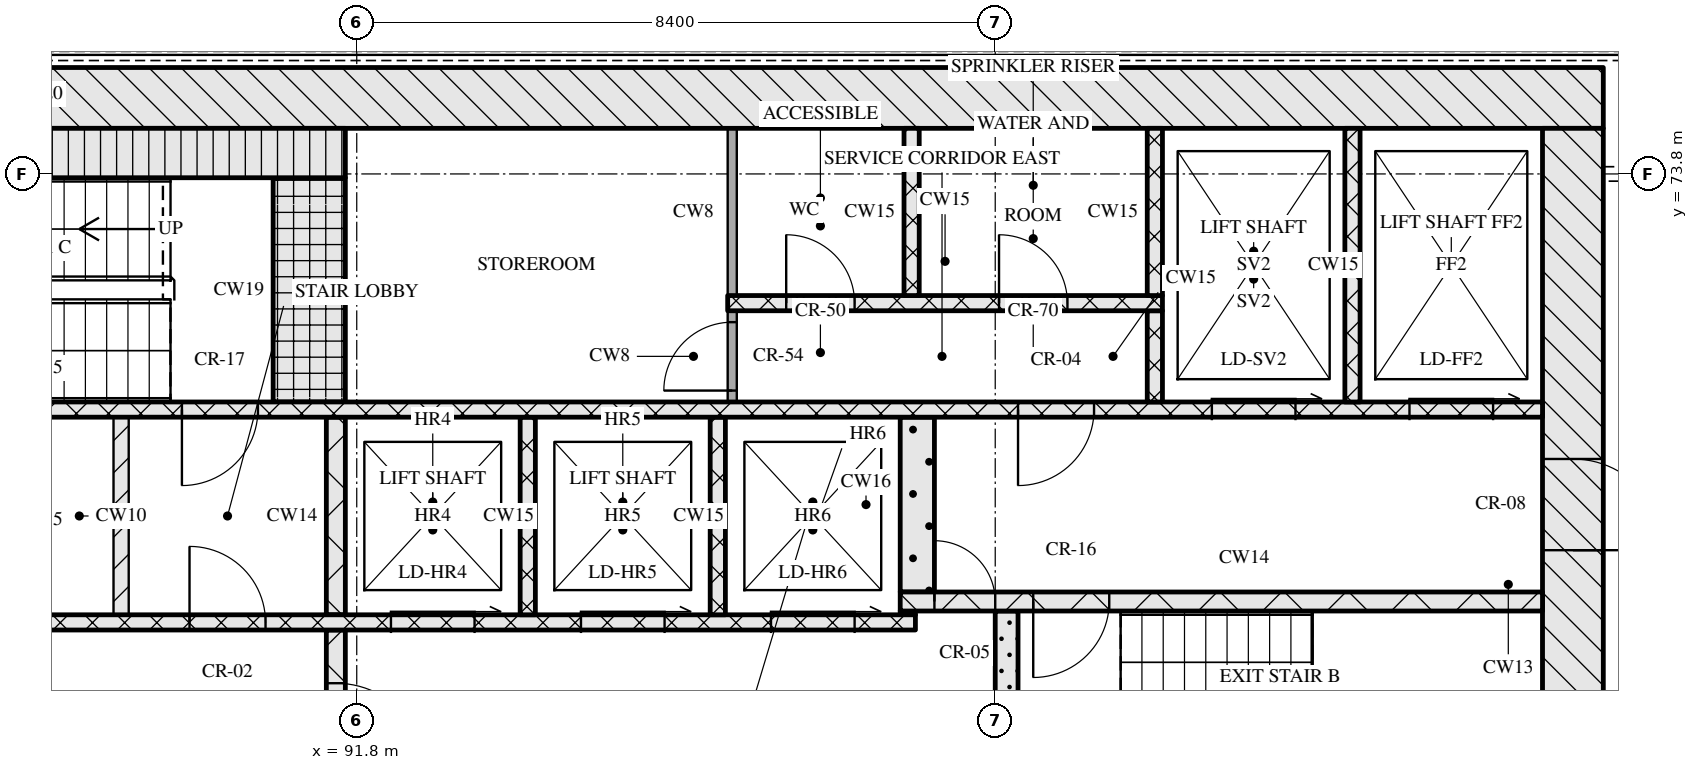
"""IFC4 building model, lengths in metres.
Left out: names, types, materials, properties, quantities, classifications, styles, units other than length and angle.
Written with IfcOpenShell. Run it as: python <this file> out.ifc"""

import sys

from ifc_helpers import new_model, si_unit, direction, frame, frame_2d, origin, place, context, subcontext, project, spatial, rectangle, extrude, element, fill, save


model = new_model("IFC4")
c1 = context("Model", 3, precision=1e-05, world=origin(), true_north=direction((0.0, 1.0)))
c2 = subcontext(c1, "Body", "Model", "MODEL_VIEW")
j1 = project(units=[si_unit("LENGTHUNIT", "METRE"), si_unit("PLANEANGLEUNIT", "RADIAN")], contexts=[c1])
p1 = place(None, origin())
s1 = spatial("IfcSite", under=j1, at=p1, CompositionType="ELEMENT")
p2 = place(p1, origin())
s2 = spatial("IfcBuilding", under=s1, at=p2, CompositionType="ELEMENT")
p3 = place(p2, frame((0.0, 0.0, 190.65)))
s3 = spatial("IfcBuildingStorey", under=s2, at=p3, CompositionType="ELEMENT", Elevation=190.65)
p4 = place(p3, frame((67.0, 74.8, 0.0), z_axis=(0.0, 0.0, 1.0), x_axis=(1.0, 0.0, 0.0)))
e1 = element("IfcWall", 1, at=p4, inside=s3, PredefinedType="SOLIDWALL", context=c2, shape_type="SweptSolid", body=[
    extrude(rectangle(XDim=41.2, YDim=0.8, at=frame_2d((20.6, 0.0))), origin(), (0.0, 0.0, 1.0), 3.3),
])
p5 = place(p3, frame((107.8, 62.4, 0.0), z_axis=(0.0, 0.0, 1.0), x_axis=(0.0, 1.0, 0.0)))
e2 = element("IfcWall", 2, at=p5, inside=s3, PredefinedType="SOLIDWALL", context=c2, shape_type="SweptSolid", body=[
    extrude(rectangle(XDim=12.0, YDim=0.8, at=frame_2d((6.0, 0.0))), origin(), (0.0, 0.0, 1.0), 3.3),
])
p6 = place(p5, frame((6.45, 0.0, 0.0)))
e3 = element("IfcOpeningElement", 3, at=p6, cuts=e2, PredefinedType="OPENING", context=c2, shape_type="SweptSolid", body=[
    extrude(rectangle(XDim=1.2, YDim=2.1, at=frame_2d((0.6, 1.05))), frame((0.0, 0.41, 0.0), z_axis=(0.0, -1.0, 0.0), x_axis=(1.0, 0.0, 0.0)), (0.0, 0.0, 1.0), 0.82),
])
p7 = place(p3, frame((91.525, 65.2, 0.0), z_axis=(0.0, 0.0, 1.0), x_axis=(0.0, 1.0, 0.0)))
e4 = element("IfcWall", 4, at=p7, inside=s3, PredefinedType="SOLIDWALL", context=c2, shape_type="SweptSolid", body=[
    extrude(rectangle(XDim=2.6, YDim=0.25, at=frame_2d((1.3, 0.0))), origin(), (0.0, 0.0, 1.0), 3.3),
])
p8 = place(p7, frame((0.7, 0.0, 0.0)))
e5 = element("IfcOpeningElement", 5, at=p8, cuts=e4, PredefinedType="OPENING", context=c2, shape_type="SweptSolid", body=[
    extrude(rectangle(XDim=1.2, YDim=2.1, at=frame_2d((0.6, 1.05))), frame((0.0, 0.135, 0.0), z_axis=(0.0, -1.0, 0.0), x_axis=(1.0, 0.0, 0.0)), (0.0, 0.0, 1.0), 0.27),
])
p9 = place(p3, frame((100.35, 65.2, 0.0), z_axis=(0.0, 0.0, 1.0), x_axis=(0.0, 1.0, 0.0)))
e6 = element("IfcWall", 6, at=p9, inside=s3, PredefinedType="SOLIDWALL", context=c2, shape_type="SweptSolid", body=[
    extrude(rectangle(XDim=2.85, YDim=0.3, at=frame_2d((1.425, 0.0))), origin(), (0.0, 0.0, 1.0), 3.3),
])
p10 = place(p3, frame((76.05, 67.9, 0.0), z_axis=(0.0, 0.0, 1.0), x_axis=(1.0, 0.0, 0.0)))
e7 = element("IfcWall", 7, at=p10, inside=s3, PredefinedType="SOLIDWALL", context=c2, shape_type="SweptSolid", body=[
    extrude(rectangle(XDim=23.1, YDim=0.2, at=frame_2d((11.55, 0.0))), origin(), (0.0, 0.0, 1.0), 3.3),
])
p11 = place(p10, frame((1.95, 0.0, 0.0)))
e8 = element("IfcOpeningElement", 8, at=p11, cuts=e7, PredefinedType="OPENING", context=c2, shape_type="SweptSolid", body=[
    extrude(rectangle(XDim=0.9, YDim=2.1, at=frame_2d((0.45, 1.05))), frame((0.0, 0.11, 0.0), z_axis=(0.0, -1.0, 0.0), x_axis=(1.0, 0.0, 0.0)), (0.0, 0.0, 1.0), 0.22),
])
p12 = place(p10, frame((5.66, 0.0, 0.0)))
e9 = element("IfcOpeningElement", 9, at=p12, cuts=e7, PredefinedType="OPENING", context=c2, shape_type="SweptSolid", body=[
    extrude(rectangle(XDim=0.9, YDim=2.1, at=frame_2d((0.45, 1.05))), frame((0.0, 0.11, 0.0), z_axis=(0.0, -1.0, 0.0), x_axis=(1.0, 0.0, 0.0)), (0.0, 0.0, 1.0), 0.22),
])
p13 = place(p10, frame((9.7, 0.0, 0.0)))
e10 = element("IfcOpeningElement", 10, at=p13, cuts=e7, PredefinedType="OPENING", context=c2, shape_type="SweptSolid", body=[
    extrude(rectangle(XDim=0.9, YDim=2.1, at=frame_2d((0.45, 1.05))), frame((0.0, 0.11, 0.0), z_axis=(0.0, -1.0, 0.0), x_axis=(1.0, 0.0, 0.0)), (0.0, 0.0, 1.0), 0.22),
])
p14 = place(p10, frame((13.55, 0.0, 0.0)))
e11 = element("IfcOpeningElement", 11, at=p14, cuts=e7, PredefinedType="OPENING", context=c2, shape_type="SweptSolid", body=[
    extrude(rectangle(XDim=1.0, YDim=2.1, at=frame_2d((0.5, 1.05))), frame((0.0, 0.11, 0.0), z_axis=(0.0, -1.0, 0.0), x_axis=(1.0, 0.0, 0.0)), (0.0, 0.0, 1.0), 0.22),
])
p15 = place(p10, frame((16.2, 0.0, 0.0)))
e12 = element("IfcOpeningElement", 12, at=p15, cuts=e7, PredefinedType="OPENING", context=c2, shape_type="SweptSolid", body=[
    extrude(rectangle(XDim=1.1, YDim=2.1, at=frame_2d((0.55, 1.05))), frame((0.0, 0.11, 0.0), z_axis=(0.0, -1.0, 0.0), x_axis=(1.0, 0.0, 0.0)), (0.0, 0.0, 1.0), 0.22),
])
p16 = place(p10, frame((18.7, 0.0, 0.0)))
e13 = element("IfcOpeningElement", 13, at=p16, cuts=e7, PredefinedType="OPENING", context=c2, shape_type="SweptSolid", body=[
    extrude(rectangle(XDim=1.1, YDim=2.1, at=frame_2d((0.55, 1.05))), frame((0.0, 0.11, 0.0), z_axis=(0.0, -1.0, 0.0), x_axis=(1.0, 0.0, 0.0)), (0.0, 0.0, 1.0), 0.22),
])
p17 = place(p10, frame((21.2, 0.0, 0.0)))
e14 = element("IfcOpeningElement", 14, at=p17, cuts=e7, PredefinedType="OPENING", context=c2, shape_type="SweptSolid", body=[
    extrude(rectangle(XDim=1.1, YDim=2.1, at=frame_2d((0.55, 1.05))), frame((0.0, 0.11, 0.0), z_axis=(0.0, -1.0, 0.0), x_axis=(1.0, 0.0, 0.0)), (0.0, 0.0, 1.0), 0.22),
])
p18 = place(p3, frame((88.7, 68.0, 0.0), z_axis=(0.0, 0.0, 1.0), x_axis=(0.0, 1.0, 0.0)))
e15 = element("IfcWall", 15, at=p18, inside=s3, PredefinedType="PARTITIONING", context=c2, shape_type="SweptSolid", body=[
    extrude(rectangle(XDim=2.6, YDim=0.2, at=frame_2d((1.3, 0.0))), origin(), (0.0, 0.0, 1.0), 3.3),
])
p19 = place(p3, frame((91.525, 68.0, 0.0), z_axis=(0.0, 0.0, 1.0), x_axis=(0.0, 1.0, 0.0)))
e16 = element("IfcWall", 16, at=p19, inside=s3, PredefinedType="SOLIDWALL", context=c2, shape_type="SweptSolid", body=[
    extrude(rectangle(XDim=2.6, YDim=0.25, at=frame_2d((1.3, 0.0))), origin(), (0.0, 0.0, 1.0), 3.3),
])
for number, where, z_axis, x_axis in (
    (17, (94.05, 68.0, 0.0), (0.0, 0.0, 1.0), (0.0, 1.0, 0.0)),
    (18, (96.55, 68.0, 0.0), (0.0, 0.0, 1.0), (0.0, 1.0, 0.0)),
):
    element("IfcWall", number, at=place(p3, frame(where, z_axis=z_axis, x_axis=x_axis)), inside=s3, PredefinedType="SOLIDWALL", context=c2, shape_type="SweptSolid", body=[
        extrude(rectangle(XDim=2.6, YDim=0.2, at=frame_2d((1.3, 0.0))), origin(), (0.0, 0.0, 1.0), 3.3),
    ])
p20 = place(p3, frame((98.95, 68.025, 0.0), z_axis=(0.0, 0.0, 1.0), x_axis=(1.0, 0.0, 0.0)))
e19 = element("IfcWall", 19, at=p20, inside=s3, PredefinedType="SOLIDWALL", context=c2, shape_type="SweptSolid", body=[
    extrude(rectangle(XDim=0.2, YDim=0.05, at=frame_2d((0.1, 0.0))), origin(), (0.0, 0.0, 1.0), 3.3),
])
p21 = place(p3, frame((98.95, 68.175, 0.0), z_axis=(0.0, 0.0, 1.0), x_axis=(1.0, 0.0, 0.0)))
e20 = element("IfcWall", 20, at=p21, inside=s3, PredefinedType="SOLIDWALL", context=c2, shape_type="SweptSolid", body=[
    extrude(rectangle(XDim=8.45, YDim=0.25, at=frame_2d((4.225, 0.0))), origin(), (0.0, 0.0, 1.0), 3.3),
])
p22 = place(p21, frame((0.45, 0.0, 0.0)))
e21 = element("IfcOpeningElement", 21, at=p22, cuts=e20, PredefinedType="OPENING", context=c2, shape_type="SweptSolid", body=[
    extrude(rectangle(XDim=0.8, YDim=2.1, at=frame_2d((0.4, 1.05))), frame((0.0, 0.135, 0.0), z_axis=(0.0, -1.0, 0.0), x_axis=(1.0, 0.0, 0.0)), (0.0, 0.0, 1.0), 0.27),
])
p23 = place(p21, frame((1.75, 0.0, 0.0)))
e22 = element("IfcOpeningElement", 22, at=p23, cuts=e20, PredefinedType="OPENING", context=c2, shape_type="SweptSolid", body=[
    extrude(rectangle(XDim=1.0, YDim=2.1, at=frame_2d((0.5, 1.05))), frame((0.0, 0.135, 0.0), z_axis=(0.0, -1.0, 0.0), x_axis=(1.0, 0.0, 0.0)), (0.0, 0.0, 1.0), 0.27),
])
p24 = place(p3, frame((99.175, 68.3, 0.0), z_axis=(0.0, 0.0, 1.0), x_axis=(0.0, 1.0, 0.0)))
e23 = element("IfcWall", 23, at=p24, inside=s3, PredefinedType="SOLIDWALL", context=c2, shape_type="SweptSolid", body=[
    extrude(rectangle(XDim=2.3, YDim=0.45, at=frame_2d((1.15, 0.0))), origin(), (0.0, 0.0, 1.0), 3.3),
])
p25 = place(p3, frame((67.8, 70.7, 0.0), z_axis=(0.0, 0.0, 1.0), x_axis=(1.0, 0.0, 0.0)))
e24 = element("IfcWall", 24, at=p25, inside=s3, PredefinedType="SOLIDWALL", context=c2, shape_type="SweptSolid", body=[
    extrude(rectangle(XDim=39.6, YDim=0.2, at=frame_2d((19.8, 0.0))), origin(), (0.0, 0.0, 1.0), 3.3),
])
p26 = place(p25, frame((0.65, 0.0, 0.0)))
e25 = element("IfcOpeningElement", 25, at=p26, cuts=e24, PredefinedType="OPENING", context=c2, shape_type="SweptSolid", body=[
    extrude(rectangle(XDim=1.1, YDim=2.1, at=frame_2d((0.55, 1.05))), frame((0.0, 0.11, 0.0), z_axis=(0.0, -1.0, 0.0), x_axis=(1.0, 0.0, 0.0)), (0.0, 0.0, 1.0), 0.22),
])
p27 = place(p25, frame((3.25, 0.0, 0.0)))
e26 = element("IfcOpeningElement", 26, at=p27, cuts=e24, PredefinedType="OPENING", context=c2, shape_type="SweptSolid", body=[
    extrude(rectangle(XDim=1.1, YDim=2.1, at=frame_2d((0.55, 1.05))), frame((0.0, 0.11, 0.0), z_axis=(0.0, -1.0, 0.0), x_axis=(1.0, 0.0, 0.0)), (0.0, 0.0, 1.0), 0.22),
])
p28 = place(p25, frame((5.9, 0.0, 0.0)))
e27 = element("IfcOpeningElement", 27, at=p28, cuts=e24, PredefinedType="OPENING", context=c2, shape_type="SweptSolid", body=[
    extrude(rectangle(XDim=1.0, YDim=2.1, at=frame_2d((0.5, 1.05))), frame((0.0, 0.11, 0.0), z_axis=(0.0, -1.0, 0.0), x_axis=(1.0, 0.0, 0.0)), (0.0, 0.0, 1.0), 0.22),
])
p29 = place(p25, frame((21.7, 0.0, 0.0)))
e28 = element("IfcOpeningElement", 28, at=p29, cuts=e24, PredefinedType="OPENING", context=c2, shape_type="SweptSolid", body=[
    extrude(rectangle(XDim=1.0, YDim=2.1, at=frame_2d((0.5, 1.05))), frame((0.0, 0.11, 0.0), z_axis=(0.0, -1.0, 0.0), x_axis=(1.0, 0.0, 0.0)), (0.0, 0.0, 1.0), 0.22),
])
p30 = place(p25, frame((32.7, 0.0, 0.0)))
e29 = element("IfcOpeningElement", 29, at=p30, cuts=e24, PredefinedType="OPENING", context=c2, shape_type="SweptSolid", body=[
    extrude(rectangle(XDim=1.0, YDim=2.1, at=frame_2d((0.5, 1.05))), frame((0.0, 0.11, 0.0), z_axis=(0.0, -1.0, 0.0), x_axis=(1.0, 0.0, 0.0)), (0.0, 0.0, 1.0), 0.22),
])
p31 = place(p25, frame((35.25, 0.0, 0.0)))
e30 = element("IfcOpeningElement", 30, at=p31, cuts=e24, PredefinedType="OPENING", context=c2, shape_type="SweptSolid", body=[
    extrude(rectangle(XDim=1.1, YDim=2.1, at=frame_2d((0.55, 1.05))), frame((0.0, 0.11, 0.0), z_axis=(0.0, -1.0, 0.0), x_axis=(1.0, 0.0, 0.0)), (0.0, 0.0, 1.0), 0.22),
])
p32 = place(p25, frame((37.85, 0.0, 0.0)))
e31 = element("IfcOpeningElement", 31, at=p32, cuts=e24, PredefinedType="OPENING", context=c2, shape_type="SweptSolid", body=[
    extrude(rectangle(XDim=1.1, YDim=2.1, at=frame_2d((0.55, 1.05))), frame((0.0, 0.11, 0.0), z_axis=(0.0, -1.0, 0.0), x_axis=(1.0, 0.0, 0.0)), (0.0, 0.0, 1.0), 0.22),
])
p33 = place(p3, frame((91.175, 70.8, 0.0), z_axis=(0.0, 0.0, 1.0), x_axis=(0.0, 1.0, 0.0)))
e32 = element("IfcWall", 32, at=p33, inside=s3, PredefinedType="SOLIDWALL", context=c2, shape_type="SweptSolid", body=[
    extrude(rectangle(XDim=2.95, YDim=0.95, at=frame_2d((1.475, 0.0))), origin(), (0.0, 0.0, 1.0), 3.3),
])
p34 = place(p3, frame((96.74, 70.8, 0.0), z_axis=(0.0, 0.0, 1.0), x_axis=(0.0, 1.0, 0.0)))
e33 = element("IfcWall", 33, at=p34, inside=s3, PredefinedType="PARTITIONING", context=c2, shape_type="SweptSolid", body=[
    extrude(rectangle(XDim=1.2, YDim=0.12, at=frame_2d((0.6, 0.0))), origin(), (0.0, 0.0, 1.0), 3.3),
])
p35 = place(p34, frame((0.15, 0.0, 0.0)))
e34 = element("IfcOpeningElement", 34, at=p35, cuts=e33, PredefinedType="OPENING", context=c2, shape_type="SweptSolid", body=[
    extrude(rectangle(XDim=0.9, YDim=2.1, at=frame_2d((0.45, 1.05))), frame((0.0, 0.07, 0.0), z_axis=(0.0, -1.0, 0.0), x_axis=(1.0, 0.0, 0.0)), (0.0, 0.0, 1.0), 0.14),
])
p36 = place(p3, frame((102.3, 70.8, 0.0), z_axis=(0.0, 0.0, 1.0), x_axis=(0.0, 1.0, 0.0)))
e35 = element("IfcWall", 35, at=p36, inside=s3, PredefinedType="SOLIDWALL", context=c2, shape_type="SweptSolid", body=[
    extrude(rectangle(XDim=1.2, YDim=0.2, at=frame_2d((0.6, 0.0))), origin(), (0.0, 0.0, 1.0), 3.3),
])
p37 = place(p3, frame((104.9, 70.8, 0.0), z_axis=(0.0, 0.0, 1.0), x_axis=(0.0, 1.0, 0.0)))
e36 = element("IfcWall", 36, at=p37, inside=s3, PredefinedType="SOLIDWALL", context=c2, shape_type="SweptSolid", body=[
    extrude(rectangle(XDim=3.6, YDim=0.2, at=frame_2d((1.8, 0.0))), origin(), (0.0, 0.0, 1.0), 3.3),
])
p38 = place(p3, frame((96.68, 72.1, 0.0), z_axis=(0.0, 0.0, 1.0), x_axis=(1.0, 0.0, 0.0)))
e37 = element("IfcWall", 37, at=p38, inside=s3, PredefinedType="SOLIDWALL", context=c2, shape_type="SweptSolid", body=[
    extrude(rectangle(XDim=5.72, YDim=0.2, at=frame_2d((2.86, 0.0))), origin(), (0.0, 0.0, 1.0), 3.3),
])
p39 = place(p38, frame((0.77, 0.0, 0.0)))
e38 = element("IfcOpeningElement", 38, at=p39, cuts=e37, PredefinedType="OPENING", context=c2, shape_type="SweptSolid", body=[
    extrude(rectangle(XDim=0.9, YDim=2.1, at=frame_2d((0.45, 1.05))), frame((0.0, 0.11, 0.0), z_axis=(0.0, -1.0, 0.0), x_axis=(1.0, 0.0, 0.0)), (0.0, 0.0, 1.0), 0.22),
])
p40 = place(p38, frame((3.57, 0.0, 0.0)))
e39 = element("IfcOpeningElement", 39, at=p40, cuts=e37, PredefinedType="OPENING", context=c2, shape_type="SweptSolid", body=[
    extrude(rectangle(XDim=0.9, YDim=2.1, at=frame_2d((0.45, 1.05))), frame((0.0, 0.11, 0.0), z_axis=(0.0, -1.0, 0.0), x_axis=(1.0, 0.0, 0.0)), (0.0, 0.0, 1.0), 0.22),
])
p41 = place(p3, frame((96.74, 72.2, 0.0), z_axis=(0.0, 0.0, 1.0), x_axis=(0.0, 1.0, 0.0)))
e40 = element("IfcWall", 40, at=p41, inside=s3, PredefinedType="PARTITIONING", context=c2, shape_type="SweptSolid", body=[
    extrude(rectangle(XDim=2.2, YDim=0.12, at=frame_2d((1.1, 0.0))), origin(), (0.0, 0.0, 1.0), 3.3),
])
for number, where, z_axis, x_axis in (
    (41, (99.1, 72.2, 0.0), (0.0, 0.0, 1.0), (0.0, 1.0, 0.0)),
    (42, (102.3, 72.2, 0.0), (0.0, 0.0, 1.0), (0.0, 1.0, 0.0)),
):
    element("IfcWall", number, at=place(p3, frame(where, z_axis=z_axis, x_axis=x_axis)), inside=s3, PredefinedType="SOLIDWALL", context=c2, shape_type="SweptSolid", body=[
        extrude(rectangle(XDim=2.2, YDim=0.2, at=frame_2d((1.1, 0.0))), origin(), (0.0, 0.0, 1.0), 3.3),
    ])
p42 = place(p3, frame((83.55, 74.075, 0.0), z_axis=(0.0, 0.0, 1.0), x_axis=(1.0, 0.0, 0.0)))
e43 = element("IfcWall", 43, at=p42, inside=s3, PredefinedType="SOLIDWALL", context=c2, shape_type="SweptSolid", body=[
    extrude(rectangle(XDim=8.1, YDim=0.65, at=frame_2d((4.05, 0.0))), origin(), (0.0, 0.0, 1.0), 3.3),
])
p43 = place(p8, origin())
e44 = element("IfcDoor", 44, at=p43, inside=s3, OperationType="SINGLE_SWING_RIGHT", PredefinedType="DOOR", context=c2, shape_type="SweptSolid", body=[
    extrude(rectangle(XDim=1.2, YDim=2.1, at=frame_2d((0.6, 1.05))), frame((0.0, 0.025, 0.0), z_axis=(0.0, -1.0, 0.0), x_axis=(1.0, 0.0, 0.0)), (0.0, 0.0, 1.0), 0.05),
])
fill(e5, e44)
p44 = place(p14, origin())
e45 = element("IfcDoor", 45, at=p44, inside=s3, OperationType="SINGLE_SWING_LEFT", PredefinedType="DOOR", context=c2, shape_type="SweptSolid", body=[
    extrude(rectangle(XDim=1.0, YDim=2.1, at=frame_2d((0.5, 1.05))), frame((0.0, 0.025, 0.0), z_axis=(0.0, -1.0, 0.0), x_axis=(1.0, 0.0, 0.0)), (0.0, 0.0, 1.0), 0.05),
])
fill(e11, e45)
p45 = place(p15, origin())
e46 = element("IfcDoor", 46, at=p45, inside=s3, OperationType="SLIDING_TO_RIGHT", PredefinedType="DOOR", context=c2, shape_type="SweptSolid", body=[
    extrude(rectangle(XDim=1.1, YDim=2.1, at=frame_2d((0.55, 1.05))), frame((0.0, 0.025, 0.0), z_axis=(0.0, -1.0, 0.0), x_axis=(1.0, 0.0, 0.0)), (0.0, 0.0, 1.0), 0.05),
])
fill(e12, e46)
p46 = place(p16, origin())
e47 = element("IfcDoor", 47, at=p46, inside=s3, OperationType="SLIDING_TO_RIGHT", PredefinedType="DOOR", context=c2, shape_type="SweptSolid", body=[
    extrude(rectangle(XDim=1.1, YDim=2.1, at=frame_2d((0.55, 1.05))), frame((0.0, 0.025, 0.0), z_axis=(0.0, -1.0, 0.0), x_axis=(1.0, 0.0, 0.0)), (0.0, 0.0, 1.0), 0.05),
])
fill(e13, e47)
p47 = place(p17, origin())
e48 = element("IfcDoor", 48, at=p47, inside=s3, OperationType="SLIDING_TO_RIGHT", PredefinedType="DOOR", context=c2, shape_type="SweptSolid", body=[
    extrude(rectangle(XDim=1.1, YDim=2.1, at=frame_2d((0.55, 1.05))), frame((0.0, 0.025, 0.0), z_axis=(0.0, -1.0, 0.0), x_axis=(1.0, 0.0, 0.0)), (0.0, 0.0, 1.0), 0.05),
])
fill(e14, e48)
p48 = place(p22, origin())
e49 = element("IfcDoor", 49, at=p48, inside=s3, OperationType="SINGLE_SWING_LEFT", PredefinedType="DOOR", context=c2, shape_type="SweptSolid", body=[
    extrude(rectangle(XDim=0.8, YDim=2.1, at=frame_2d((0.4, 1.05))), frame((0.0, 0.025, 0.0), z_axis=(0.0, -1.0, 0.0), x_axis=(1.0, 0.0, 0.0)), (0.0, 0.0, 1.0), 0.05),
])
fill(e21, e49)
p49 = place(p23, origin())
e50 = element("IfcDoor", 50, at=p49, inside=s3, OperationType="SINGLE_SWING_RIGHT", PredefinedType="DOOR", context=c2, shape_type="SweptSolid", body=[
    extrude(rectangle(XDim=1.0, YDim=2.1, at=frame_2d((0.5, 1.05))), frame((0.0, 0.025, 0.0), z_axis=(0.0, -1.0, 0.0), x_axis=(1.0, 0.0, 0.0)), (0.0, 0.0, 1.0), 0.05),
])
fill(e22, e50)
p50 = place(p6, origin())
e51 = element("IfcDoor", 51, at=p50, inside=s3, OperationType="SINGLE_SWING_RIGHT", PredefinedType="DOOR", context=c2, shape_type="SweptSolid", body=[
    extrude(rectangle(XDim=1.2, YDim=2.1, at=frame_2d((0.6, 1.05))), frame((0.0, 0.025, 0.0), z_axis=(0.0, -1.0, 0.0), x_axis=(1.0, 0.0, 0.0)), (0.0, 0.0, 1.0), 0.05),
])
fill(e3, e51)
p51 = place(p29, origin())
e52 = element("IfcDoor", 52, at=p51, inside=s3, OperationType="SINGLE_SWING_RIGHT", PredefinedType="DOOR", context=c2, shape_type="SweptSolid", body=[
    extrude(rectangle(XDim=1.0, YDim=2.1, at=frame_2d((0.5, 1.05))), frame((0.0, 0.025, 0.0), z_axis=(0.0, -1.0, 0.0), x_axis=(1.0, 0.0, 0.0)), (0.0, 0.0, 1.0), 0.05),
])
fill(e28, e52)
p52 = place(p30, origin())
e53 = element("IfcDoor", 53, at=p52, inside=s3, OperationType="SINGLE_SWING_RIGHT", PredefinedType="DOOR", context=c2, shape_type="SweptSolid", body=[
    extrude(rectangle(XDim=1.0, YDim=2.1, at=frame_2d((0.5, 1.05))), frame((0.0, 0.025, 0.0), z_axis=(0.0, -1.0, 0.0), x_axis=(1.0, 0.0, 0.0)), (0.0, 0.0, 1.0), 0.05),
])
fill(e29, e53)
p53 = place(p31, origin())
e54 = element("IfcDoor", 54, at=p53, inside=s3, OperationType="SLIDING_TO_RIGHT", PredefinedType="DOOR", context=c2, shape_type="SweptSolid", body=[
    extrude(rectangle(XDim=1.1, YDim=2.1, at=frame_2d((0.55, 1.05))), frame((0.0, 0.025, 0.0), z_axis=(0.0, -1.0, 0.0), x_axis=(1.0, 0.0, 0.0)), (0.0, 0.0, 1.0), 0.05),
])
fill(e30, e54)
p54 = place(p32, origin())
e55 = element("IfcDoor", 55, at=p54, inside=s3, OperationType="SLIDING_TO_RIGHT", PredefinedType="DOOR", context=c2, shape_type="SweptSolid", body=[
    extrude(rectangle(XDim=1.1, YDim=2.1, at=frame_2d((0.55, 1.05))), frame((0.0, 0.025, 0.0), z_axis=(0.0, -1.0, 0.0), x_axis=(1.0, 0.0, 0.0)), (0.0, 0.0, 1.0), 0.05),
])
fill(e31, e55)
p55 = place(p35, origin())
e56 = element("IfcDoor", 56, at=p55, inside=s3, OperationType="SINGLE_SWING_LEFT", PredefinedType="DOOR", context=c2, shape_type="SweptSolid", body=[
    extrude(rectangle(XDim=0.9, YDim=2.1, at=frame_2d((0.45, 1.05))), frame((0.0, 0.025, 0.0), z_axis=(0.0, -1.0, 0.0), x_axis=(1.0, 0.0, 0.0)), (0.0, 0.0, 1.0), 0.05),
])
fill(e34, e56)
p56 = place(p39, origin())
e57 = element("IfcDoor", 57, at=p56, inside=s3, OperationType="SINGLE_SWING_LEFT", PredefinedType="DOOR", context=c2, shape_type="SweptSolid", body=[
    extrude(rectangle(XDim=0.9, YDim=2.1, at=frame_2d((0.45, 1.05))), frame((0.0, 0.025, 0.0), z_axis=(0.0, -1.0, 0.0), x_axis=(1.0, 0.0, 0.0)), (0.0, 0.0, 1.0), 0.05),
])
fill(e38, e57)
p57 = place(p40, origin())
e58 = element("IfcDoor", 58, at=p57, inside=s3, OperationType="SINGLE_SWING_LEFT", PredefinedType="DOOR", context=c2, shape_type="SweptSolid", body=[
    extrude(rectangle(XDim=0.9, YDim=2.1, at=frame_2d((0.45, 1.05))), frame((0.0, 0.025, 0.0), z_axis=(0.0, -1.0, 0.0), x_axis=(1.0, 0.0, 0.0)), (0.0, 0.0, 1.0), 0.05),
])
fill(e39, e58)
save(model, sys.argv[1])
